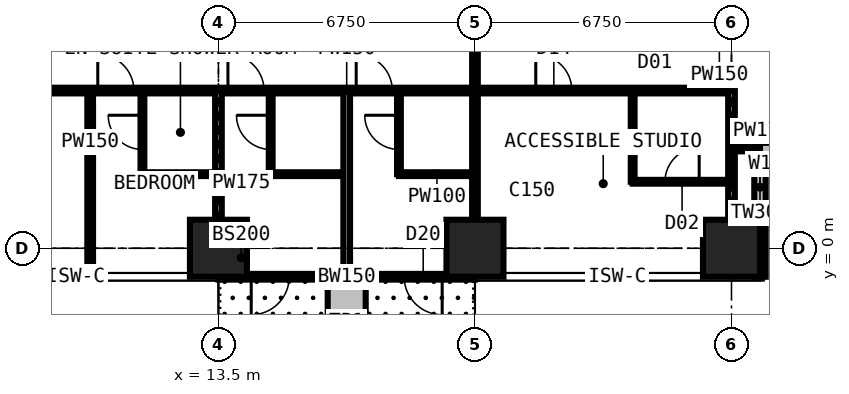
"""IFC4 building model, lengths in metres.
Left out: names, types, materials, properties, quantities, classifications, styles, units other than length and angle.
Written with IfcOpenShell. Run it as: python <this file> out.ifc"""

import sys

from ifc_helpers import new_model, si_unit, direction, frame, frame_2d, origin, origin_2d, place, context, subcontext, project, spatial, rectangle, extrude, element, fill, save


model = new_model("IFC4")
c1 = context("Model", 3, precision=1e-05, world=origin(), true_north=direction((0.0, 1.0)))
c2 = subcontext(c1, "Body", "Model", "MODEL_VIEW")
j1 = project(units=[si_unit("LENGTHUNIT", "METRE"), si_unit("PLANEANGLEUNIT", "RADIAN")], contexts=[c1])
p1 = place(None, origin())
s1 = spatial("IfcSite", under=j1, at=p1, CompositionType="ELEMENT")
p2 = place(p1, origin())
s2 = spatial("IfcBuilding", under=s1, at=p2, CompositionType="ELEMENT")
p3 = place(p2, frame((0.0, 0.0, 149.4)))
s3 = spatial("IfcBuildingStorey", under=s2, at=p3, CompositionType="ELEMENT", Elevation=149.4)
for number, where, z_axis, x_axis in (
    (1, (13.5, 0.0, 0.0), (0.0, 0.0, 1.0), (1.0, 0.0, 0.0)),
    (2, (20.25, 0.0, 0.0), (0.0, 0.0, 1.0), (1.0, 0.0, 0.0)),
    (3, (27.0, 0.0, 0.0), (0.0, 0.0, 1.0), (1.0, 0.0, 0.0)),
):
    element("IfcColumn", number, at=place(p3, frame(where, z_axis=z_axis, x_axis=x_axis)), inside=s3, PredefinedType="COLUMN", context=c2, shape_type="SweptSolid", body=[
        extrude(rectangle(XDim=1.5, YDim=1.5, at=origin_2d()), origin(), (0.0, 0.0, 1.0), 3.6),
    ])
p4 = place(p3, frame((20.25, -0.75, 0.0), z_axis=(0.0, 0.0, 1.0), x_axis=(-1.0, 0.0, 0.0)))
e4 = element("IfcWall", 4, at=p4, inside=s3, PredefinedType="SOLIDWALL", context=c2, shape_type="SweptSolid", body=[
    extrude(rectangle(XDim=6.75, YDim=0.15, at=frame_2d((3.375, 0.0))), origin(), (0.0, 0.0, 1.0), 3.375),
])
p5 = place(p4, frame((0.863, 0.0, 0.0)))
e5 = element("IfcOpeningElement", 5, at=p5, cuts=e4, PredefinedType="OPENING", context=c2, shape_type="SweptSolid", body=[
    extrude(rectangle(XDim=1.0, YDim=2.2, at=frame_2d((0.5, 1.1))), frame((0.0, 0.085, 0.0), z_axis=(0.0, -1.0, 0.0), x_axis=(1.0, 0.0, 0.0)), (0.0, 0.0, 1.0), 0.17),
])
p6 = place(p4, frame((1.975, 0.0, 0.9)))
e6 = element("IfcOpeningElement", 6, at=p6, cuts=e4, PredefinedType="OPENING", context=c2, shape_type="SweptSolid", body=[
    extrude(rectangle(XDim=1.2, YDim=1.8, at=frame_2d((0.6, 0.9))), frame((0.0, 0.085, 0.0), z_axis=(0.0, -1.0, 0.0), x_axis=(1.0, 0.0, 0.0)), (0.0, 0.0, 1.0), 0.17),
])
p7 = place(p4, frame((4.887, 0.0, 0.0)))
e7 = element("IfcOpeningElement", 7, at=p7, cuts=e4, PredefinedType="OPENING", context=c2, shape_type="SweptSolid", body=[
    extrude(rectangle(XDim=1.0, YDim=2.2, at=frame_2d((0.5, 1.1))), frame((0.0, 0.085, 0.0), z_axis=(0.0, -1.0, 0.0), x_axis=(1.0, 0.0, 0.0)), (0.0, 0.0, 1.0), 0.17),
])
p8 = place(p4, frame((3.575, 0.0, 0.9)))
e8 = element("IfcOpeningElement", 8, at=p8, cuts=e4, PredefinedType="OPENING", context=c2, shape_type="SweptSolid", body=[
    extrude(rectangle(XDim=1.2, YDim=1.8, at=frame_2d((0.6, 0.9))), frame((0.0, 0.085, 0.0), z_axis=(0.0, -1.0, 0.0), x_axis=(1.0, 0.0, 0.0)), (0.0, 0.0, 1.0), 0.17),
])
p9 = place(p3, frame((27.75, -0.75, 0.0), z_axis=(0.0, 0.0, 1.0), x_axis=(0.0, 1.0, 0.0)))
e9 = element("IfcWall", 9, at=p9, inside=s3, PredefinedType="SOLIDWALL", context=c2, shape_type="SweptSolid", body=[
    extrude(rectangle(XDim=3.375, YDim=0.3, at=frame_2d((1.688, 0.0))), origin(), (0.0, 0.0, 1.0), 3.375),
])
p10 = place(p9, frame((1.607, 0.0, 0.9)))
e10 = element("IfcOpeningElement", 10, at=p10, cuts=e9, PredefinedType="OPENING", context=c2, shape_type="SweptSolid", body=[
    extrude(rectangle(XDim=1.5, YDim=1.8, at=frame_2d((0.75, 0.9))), frame((0.0, 0.16, 0.0), z_axis=(0.0, -1.0, 0.0), x_axis=(1.0, 0.0, 0.0)), (0.0, 0.0, 1.0), 0.32),
])
p11 = place(p3, frame((27.75, 2.625, 0.0), z_axis=(0.0, 0.0, 1.0), x_axis=(1.0, 0.0, 0.0)))
e11 = element("IfcWall", 11, at=p11, inside=s3, PredefinedType="SOLIDWALL", context=c2, shape_type="SweptSolid", body=[
    extrude(rectangle(XDim=3.375, YDim=0.3, at=frame_2d((1.688, 0.0))), origin(), (0.0, 0.0, 1.0), 3.375),
])
p12 = place(p11, frame((0.788, 0.0, 0.6)))
e12 = element("IfcOpeningElement", 12, at=p12, cuts=e11, PredefinedType="OPENING", context=c2, shape_type="SweptSolid", body=[
    extrude(rectangle(XDim=1.8, YDim=2.1, at=frame_2d((0.9, 1.05))), frame((0.0, 0.16, 0.0), z_axis=(0.0, -1.0, 0.0), x_axis=(1.0, 0.0, 0.0)), (0.0, 0.0, 1.0), 0.32),
])
p13 = place(p3, frame((16.875, -0.85, 0.0), z_axis=(0.0, 0.0, 1.0), x_axis=(0.0, -1.0, 0.0)))
e13 = element("IfcWall", 13, at=p13, inside=s3, PredefinedType="USERDEFINED", context=c2, shape_type="SweptSolid", body=[
    extrude(rectangle(XDim=2.2, YDim=1.0, at=frame_2d((1.1, 0.0))), origin(), (0.0, 0.0, 1.0), 0.9),
])
p14 = place(p3, frame((6.75, 4.15, 0.0), z_axis=(0.0, 0.0, 1.0), x_axis=(1.0, 0.0, 0.0)))
e14 = element("IfcWall", 14, at=p14, inside=s3, PredefinedType="PARTITIONING", context=c2, shape_type="SweptSolid", body=[
    extrude(rectangle(XDim=20.25, YDim=0.15, at=frame_2d((10.125, 0.0))), origin(), (0.0, 0.0, 1.0), 3.375),
])
p15 = place(p14, frame((1.2, 0.0, 0.0)))
e15 = element("IfcOpeningElement", 15, at=p15, cuts=e14, PredefinedType="OPENING", context=c2, shape_type="SweptSolid", body=[
    extrude(rectangle(XDim=1.0, YDim=2.2, at=frame_2d((0.5, 1.1))), frame((0.0, 0.085, 0.0), z_axis=(0.0, -1.0, 0.0), x_axis=(1.0, 0.0, 0.0)), (0.0, 0.0, 1.0), 0.17),
])
p16 = place(p14, frame((3.575, 0.0, 0.0)))
e16 = element("IfcOpeningElement", 16, at=p16, cuts=e14, PredefinedType="OPENING", context=c2, shape_type="SweptSolid", body=[
    extrude(rectangle(XDim=0.95, YDim=2.2, at=frame_2d((0.475, 1.1))), frame((0.0, 0.085, 0.0), z_axis=(0.0, -1.0, 0.0), x_axis=(1.0, 0.0, 0.0)), (0.0, 0.0, 1.0), 0.17),
])
p17 = place(p14, frame((7.0, 0.0, 0.0)))
e17 = element("IfcOpeningElement", 17, at=p17, cuts=e14, PredefinedType="OPENING", context=c2, shape_type="SweptSolid", body=[
    extrude(rectangle(XDim=0.95, YDim=2.2, at=frame_2d((0.475, 1.1))), frame((0.0, 0.085, 0.0), z_axis=(0.0, -1.0, 0.0), x_axis=(1.0, 0.0, 0.0)), (0.0, 0.0, 1.0), 0.17),
])
p18 = place(p14, frame((10.375, 0.0, 0.0)))
e18 = element("IfcOpeningElement", 18, at=p18, cuts=e14, PredefinedType="OPENING", context=c2, shape_type="SweptSolid", body=[
    extrude(rectangle(XDim=0.95, YDim=2.2, at=frame_2d((0.475, 1.1))), frame((0.0, 0.085, 0.0), z_axis=(0.0, -1.0, 0.0), x_axis=(1.0, 0.0, 0.0)), (0.0, 0.0, 1.0), 0.17),
])
p19 = place(p14, frame((15.1, 0.0, 0.0)))
e19 = element("IfcOpeningElement", 19, at=p19, cuts=e14, PredefinedType="OPENING", context=c2, shape_type="SweptSolid", body=[
    extrude(rectangle(XDim=0.95, YDim=2.2, at=frame_2d((0.475, 1.1))), frame((0.0, 0.085, 0.0), z_axis=(0.0, -1.0, 0.0), x_axis=(1.0, 0.0, 0.0)), (0.0, 0.0, 1.0), 0.17),
])
p20 = place(p3, frame((10.125, -0.734, 0.0), z_axis=(0.0, 0.0, 1.0), x_axis=(0.0, 1.0, 0.0)))
e20 = element("IfcWall", 20, at=p20, inside=s3, PredefinedType="PARTITIONING", context=c2, shape_type="SweptSolid", body=[
    extrude(rectangle(XDim=4.884, YDim=0.15, at=frame_2d((2.442, 0.0))), origin(), (0.0, 0.0, 1.0), 3.375),
])
p21 = place(p3, frame((11.5, 1.95, 0.0), z_axis=(0.0, 0.0, 1.0), x_axis=(0.0, 1.0, 0.0)))
e21 = element("IfcWall", 21, at=p21, inside=s3, PredefinedType="PARTITIONING", context=c2, shape_type="SweptSolid", body=[
    extrude(rectangle(XDim=2.2, YDim=0.1, at=frame_2d((1.1, 0.0))), origin(), (0.0, 0.0, 1.0), 3.375),
])
p22 = place(p21, frame((0.65, 0.0, 0.0)))
e22 = element("IfcOpeningElement", 22, at=p22, cuts=e21, PredefinedType="OPENING", context=c2, shape_type="SweptSolid", body=[
    extrude(rectangle(XDim=0.9, YDim=2.2, at=frame_2d((0.45, 1.1))), frame((0.0, 0.06, 0.0), z_axis=(0.0, -1.0, 0.0), x_axis=(1.0, 0.0, 0.0)), (0.0, 0.0, 1.0), 0.12),
])
p23 = place(p3, frame((11.5, 1.95, 0.0), z_axis=(0.0, 0.0, 1.0), x_axis=(1.0, 0.0, 0.0)))
e23 = element("IfcWall", 23, at=p23, inside=s3, PredefinedType="PARTITIONING", context=c2, shape_type="SweptSolid", body=[
    extrude(rectangle(XDim=2.0, YDim=0.1, at=frame_2d((1.0, 0.0))), origin(), (0.0, 0.0, 1.0), 3.375),
])
p24 = place(p3, frame((13.5, -0.734, 0.0), z_axis=(0.0, 0.0, 1.0), x_axis=(0.0, 1.0, 0.0)))
e24 = element("IfcWall", 24, at=p24, inside=s3, PredefinedType="PARTITIONING", context=c2, shape_type="SweptSolid", body=[
    extrude(rectangle(XDim=4.884, YDim=0.175, at=frame_2d((2.442, 0.0))), origin(), (0.0, 0.0, 1.0), 2.877),
])
p25 = place(p3, frame((14.875, 1.95, 0.0), z_axis=(0.0, 0.0, 1.0), x_axis=(0.0, 1.0, 0.0)))
e25 = element("IfcWall", 25, at=p25, inside=s3, PredefinedType="PARTITIONING", context=c2, shape_type="SweptSolid", body=[
    extrude(rectangle(XDim=2.2, YDim=0.1, at=frame_2d((1.1, 0.0))), origin(), (0.0, 0.0, 1.0), 3.375),
])
p26 = place(p25, frame((0.65, 0.0, 0.0)))
e26 = element("IfcOpeningElement", 26, at=p26, cuts=e25, PredefinedType="OPENING", context=c2, shape_type="SweptSolid", body=[
    extrude(rectangle(XDim=0.9, YDim=2.2, at=frame_2d((0.45, 1.1))), frame((0.0, 0.06, 0.0), z_axis=(0.0, -1.0, 0.0), x_axis=(1.0, 0.0, 0.0)), (0.0, 0.0, 1.0), 0.12),
])
p27 = place(p3, frame((14.875, 1.95, 0.0), z_axis=(0.0, 0.0, 1.0), x_axis=(1.0, 0.0, 0.0)))
e27 = element("IfcWall", 27, at=p27, inside=s3, PredefinedType="PARTITIONING", context=c2, shape_type="SweptSolid", body=[
    extrude(rectangle(XDim=2.0, YDim=0.1, at=frame_2d((1.0, 0.0))), origin(), (0.0, 0.0, 1.0), 3.375),
])
p28 = place(p3, frame((16.875, -0.734, 0.0), z_axis=(0.0, 0.0, 1.0), x_axis=(0.0, 1.0, 0.0)))
e28 = element("IfcWall", 28, at=p28, inside=s3, PredefinedType="PARTITIONING", context=c2, shape_type="SweptSolid", body=[
    extrude(rectangle(XDim=4.884, YDim=0.175, at=frame_2d((2.442, 0.0))), origin(), (0.0, 0.0, 1.0), 3.375),
])
p29 = place(p3, frame((18.25, 1.95, 0.0), z_axis=(0.0, 0.0, 1.0), x_axis=(0.0, 1.0, 0.0)))
e29 = element("IfcWall", 29, at=p29, inside=s3, PredefinedType="PARTITIONING", context=c2, shape_type="SweptSolid", body=[
    extrude(rectangle(XDim=2.2, YDim=0.1, at=frame_2d((1.1, 0.0))), origin(), (0.0, 0.0, 1.0), 3.375),
])
p30 = place(p29, frame((0.65, 0.0, 0.0)))
e30 = element("IfcOpeningElement", 30, at=p30, cuts=e29, PredefinedType="OPENING", context=c2, shape_type="SweptSolid", body=[
    extrude(rectangle(XDim=0.9, YDim=2.2, at=frame_2d((0.45, 1.1))), frame((0.0, 0.06, 0.0), z_axis=(0.0, -1.0, 0.0), x_axis=(1.0, 0.0, 0.0)), (0.0, 0.0, 1.0), 0.12),
])
p31 = place(p3, frame((18.25, 1.95, 0.0), z_axis=(0.0, 0.0, 1.0), x_axis=(1.0, 0.0, 0.0)))
e31 = element("IfcWall", 31, at=p31, inside=s3, PredefinedType="PARTITIONING", context=c2, shape_type="SweptSolid", body=[
    extrude(rectangle(XDim=2.0, YDim=0.1, at=frame_2d((1.0, 0.0))), origin(), (0.0, 0.0, 1.0), 3.375),
])
p32 = place(p3, frame((20.25, -0.734, 0.0), z_axis=(0.0, 0.0, 1.0), x_axis=(0.0, 1.0, 0.0)))
e32 = element("IfcWall", 32, at=p32, inside=s3, PredefinedType="PARTITIONING", context=c2, shape_type="SweptSolid", body=[
    extrude(rectangle(XDim=12.034, YDim=0.15, at=frame_2d((6.017, 0.0))), origin(), (0.0, 0.0, 1.0), 2.806),
])
p33 = place(p3, frame((24.4, 1.75, 0.0), z_axis=(0.0, 0.0, 1.0), x_axis=(0.0, 1.0, 0.0)))
e33 = element("IfcWall", 33, at=p33, inside=s3, PredefinedType="PARTITIONING", context=c2, shape_type="SweptSolid", body=[
    extrude(rectangle(XDim=2.4, YDim=0.1, at=frame_2d((1.2, 0.0))), origin(), (0.0, 0.0, 1.0), 3.375),
])
p34 = place(p3, frame((24.4, 1.75, 0.0), z_axis=(0.0, 0.0, 1.0), x_axis=(1.0, 0.0, 0.0)))
e34 = element("IfcWall", 34, at=p34, inside=s3, PredefinedType="PARTITIONING", context=c2, shape_type="SweptSolid", body=[
    extrude(rectangle(XDim=2.6, YDim=0.1, at=frame_2d((1.3, 0.0))), origin(), (0.0, 0.0, 1.0), 3.375),
])
p35 = place(p34, frame((0.85, 0.0, 0.0)))
e35 = element("IfcOpeningElement", 35, at=p35, cuts=e34, PredefinedType="OPENING", context=c2, shape_type="SweptSolid", body=[
    extrude(rectangle(XDim=0.9, YDim=2.2, at=frame_2d((0.45, 1.1))), frame((0.0, 0.06, 0.0), z_axis=(0.0, -1.0, 0.0), x_axis=(1.0, 0.0, 0.0)), (0.0, 0.0, 1.0), 0.12),
])
p36 = place(p3, frame((27.0, -0.734, 0.0), z_axis=(0.0, 0.0, 1.0), x_axis=(0.0, 1.0, 0.0)))
e36 = element("IfcWall", 36, at=p36, inside=s3, PredefinedType="PARTITIONING", context=c2, shape_type="SweptSolid", body=[
    extrude(rectangle(XDim=4.884, YDim=0.175, at=frame_2d((2.442, 0.0))), origin(), (0.0, 0.0, 1.0), 2.877),
])
p37 = place(p3, frame((27.0, 2.625, 0.0), z_axis=(0.0, 0.0, 1.0), x_axis=(1.0, 0.0, 0.0)))
e37 = element("IfcWall", 37, at=p37, inside=s3, PredefinedType="PARTITIONING", context=c2, shape_type="SweptSolid", body=[
    extrude(rectangle(XDim=0.734, YDim=0.15, at=frame_2d((0.367, 0.0))), origin(), (0.0, 0.0, 1.0), 3.375),
])
p38 = place(p5, origin())
e38 = element("IfcDoor", 38, at=p38, inside=s3, OperationType="SINGLE_SWING_LEFT", PredefinedType="DOOR", context=c2, shape_type="SweptSolid", body=[
    extrude(rectangle(XDim=1.0, YDim=2.2, at=frame_2d((0.5, 1.1))), frame((0.0, 0.025, 0.0), z_axis=(0.0, -1.0, 0.0), x_axis=(1.0, 0.0, 0.0)), (0.0, 0.0, 1.0), 0.05),
])
fill(e5, e38)
p39 = place(p6, origin())
e39 = element("IfcWindow", 39, at=p39, inside=s3, PartitioningType="SINGLE_PANEL", PredefinedType="WINDOW", context=c2, shape_type="SweptSolid", body=[
    extrude(rectangle(XDim=1.2, YDim=1.8, at=frame_2d((0.6, 0.9))), frame((0.0, 0.03, 0.0), z_axis=(0.0, -1.0, 0.0), x_axis=(1.0, 0.0, 0.0)), (0.0, 0.0, 1.0), 0.06),
])
fill(e6, e39)
p40 = place(p7, origin())
e40 = element("IfcDoor", 40, at=p40, inside=s3, OperationType="SINGLE_SWING_RIGHT", PredefinedType="DOOR", context=c2, shape_type="SweptSolid", body=[
    extrude(rectangle(XDim=1.0, YDim=2.2, at=frame_2d((0.5, 1.1))), frame((0.0, 0.025, 0.0), z_axis=(0.0, -1.0, 0.0), x_axis=(1.0, 0.0, 0.0)), (0.0, 0.0, 1.0), 0.05),
])
fill(e7, e40)
p41 = place(p8, origin())
e41 = element("IfcWindow", 41, at=p41, inside=s3, PartitioningType="SINGLE_PANEL", PredefinedType="WINDOW", context=c2, shape_type="SweptSolid", body=[
    extrude(rectangle(XDim=1.2, YDim=1.8, at=frame_2d((0.6, 0.9))), frame((0.0, 0.03, 0.0), z_axis=(0.0, -1.0, 0.0), x_axis=(1.0, 0.0, 0.0)), (0.0, 0.0, 1.0), 0.06),
])
fill(e8, e41)
p42 = place(p10, origin())
e42 = element("IfcWindow", 42, at=p42, inside=s3, PartitioningType="SINGLE_PANEL", PredefinedType="WINDOW", context=c2, shape_type="SweptSolid", body=[
    extrude(rectangle(XDim=1.5, YDim=1.8, at=frame_2d((0.75, 0.9))), frame((0.0, 0.03, 0.0), z_axis=(0.0, -1.0, 0.0), x_axis=(1.0, 0.0, 0.0)), (0.0, 0.0, 1.0), 0.06),
])
fill(e10, e42)
p43 = place(p16, origin())
e43 = element("IfcDoor", 43, at=p43, inside=s3, OperationType="SINGLE_SWING_LEFT", PredefinedType="DOOR", context=c2, shape_type="SweptSolid", body=[
    extrude(rectangle(XDim=0.95, YDim=2.2, at=frame_2d((0.475, 1.1))), frame((0.0, 0.025, 0.0), z_axis=(0.0, -1.0, 0.0), x_axis=(1.0, 0.0, 0.0)), (0.0, 0.0, 1.0), 0.05),
])
fill(e16, e43)
p44 = place(p22, origin())
e44 = element("IfcDoor", 44, at=p44, inside=s3, OperationType="SINGLE_SWING_RIGHT", PredefinedType="DOOR", context=c2, shape_type="SweptSolid", body=[
    extrude(rectangle(XDim=0.9, YDim=2.2, at=frame_2d((0.45, 1.1))), frame((0.0, 0.025, 0.0), z_axis=(0.0, -1.0, 0.0), x_axis=(1.0, 0.0, 0.0)), (0.0, 0.0, 1.0), 0.05),
])
fill(e22, e44)
p45 = place(p17, origin())
e45 = element("IfcDoor", 45, at=p45, inside=s3, OperationType="SINGLE_SWING_LEFT", PredefinedType="DOOR", context=c2, shape_type="SweptSolid", body=[
    extrude(rectangle(XDim=0.95, YDim=2.2, at=frame_2d((0.475, 1.1))), frame((0.0, 0.025, 0.0), z_axis=(0.0, -1.0, 0.0), x_axis=(1.0, 0.0, 0.0)), (0.0, 0.0, 1.0), 0.05),
])
fill(e17, e45)
p46 = place(p26, origin())
e46 = element("IfcDoor", 46, at=p46, inside=s3, OperationType="SINGLE_SWING_RIGHT", PredefinedType="DOOR", context=c2, shape_type="SweptSolid", body=[
    extrude(rectangle(XDim=0.9, YDim=2.2, at=frame_2d((0.45, 1.1))), frame((0.0, 0.025, 0.0), z_axis=(0.0, -1.0, 0.0), x_axis=(1.0, 0.0, 0.0)), (0.0, 0.0, 1.0), 0.05),
])
fill(e26, e46)
p47 = place(p18, origin())
e47 = element("IfcDoor", 47, at=p47, inside=s3, OperationType="SINGLE_SWING_LEFT", PredefinedType="DOOR", context=c2, shape_type="SweptSolid", body=[
    extrude(rectangle(XDim=0.95, YDim=2.2, at=frame_2d((0.475, 1.1))), frame((0.0, 0.025, 0.0), z_axis=(0.0, -1.0, 0.0), x_axis=(1.0, 0.0, 0.0)), (0.0, 0.0, 1.0), 0.05),
])
fill(e18, e47)
p48 = place(p30, origin())
e48 = element("IfcDoor", 48, at=p48, inside=s3, OperationType="SINGLE_SWING_RIGHT", PredefinedType="DOOR", context=c2, shape_type="SweptSolid", body=[
    extrude(rectangle(XDim=0.9, YDim=2.2, at=frame_2d((0.45, 1.1))), frame((0.0, 0.025, 0.0), z_axis=(0.0, -1.0, 0.0), x_axis=(1.0, 0.0, 0.0)), (0.0, 0.0, 1.0), 0.05),
])
fill(e30, e48)
p49 = place(p19, origin())
e49 = element("IfcDoor", 49, at=p49, inside=s3, OperationType="SINGLE_SWING_LEFT", PredefinedType="DOOR", context=c2, shape_type="SweptSolid", body=[
    extrude(rectangle(XDim=0.95, YDim=2.2, at=frame_2d((0.475, 1.1))), frame((0.0, 0.025, 0.0), z_axis=(0.0, -1.0, 0.0), x_axis=(1.0, 0.0, 0.0)), (0.0, 0.0, 1.0), 0.05),
])
fill(e19, e49)
p50 = place(p35, origin())
e50 = element("IfcDoor", 50, at=p50, inside=s3, OperationType="SINGLE_SWING_RIGHT", PredefinedType="DOOR", context=c2, shape_type="SweptSolid", body=[
    extrude(rectangle(XDim=0.9, YDim=2.2, at=frame_2d((0.45, 1.1))), frame((0.0, 0.025, 0.0), z_axis=(0.0, -1.0, 0.0), x_axis=(1.0, 0.0, 0.0)), (0.0, 0.0, 1.0), 0.05),
])
fill(e35, e50)
save(model, sys.argv[1])
